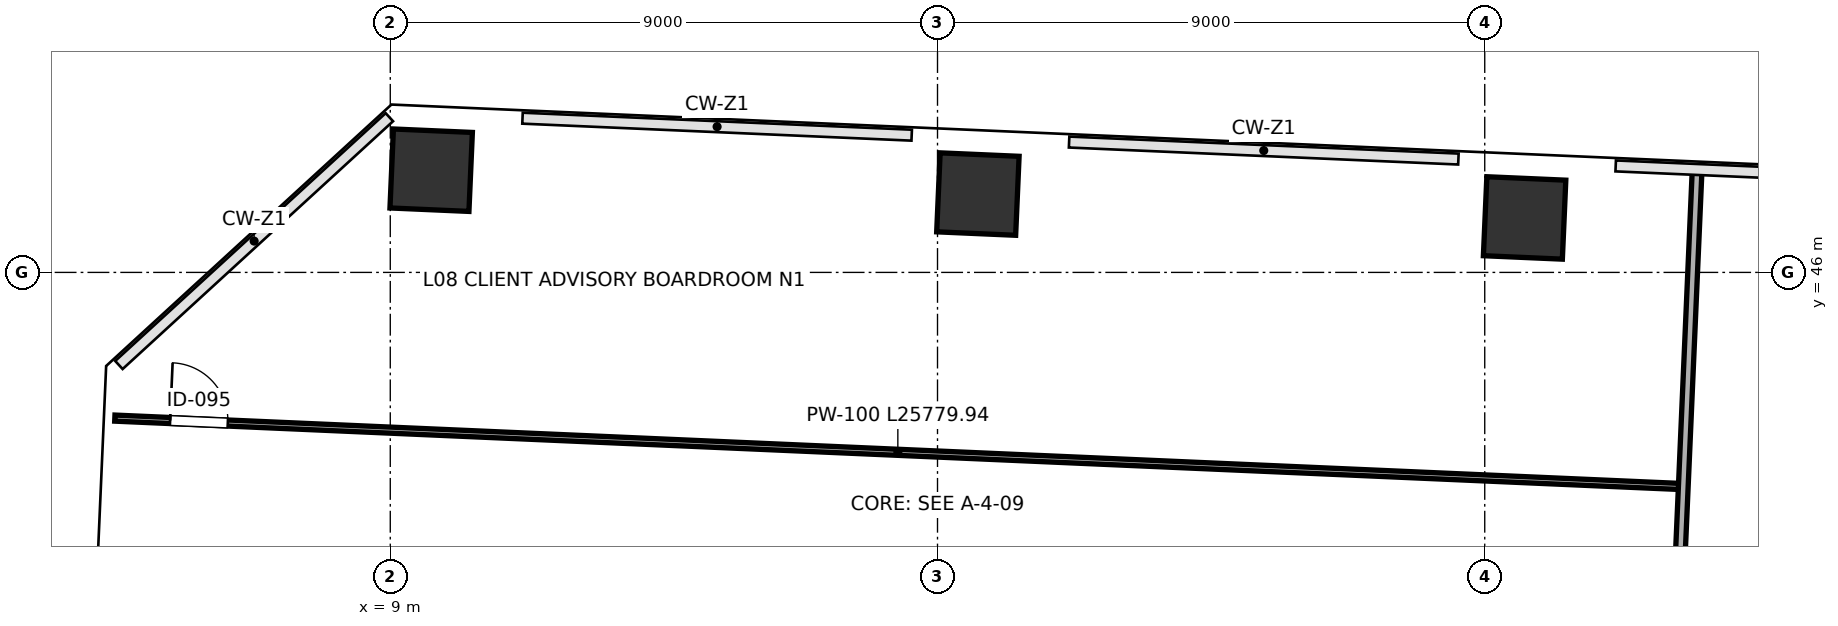
"""IFC4 building model, lengths in metres.
Left out: names, types, materials, properties, quantities, classifications, styles, units other than length and angle.
Written with IfcOpenShell. Run it as: python <this file> out.ifc"""

import sys

from ifc_helpers import new_model, si_unit, direction, frame, frame_2d, origin, origin_2d, place, context, subcontext, project, spatial, rectangle, extrude, clip, halfspace, source, transform, mapped, element, fill, save


model = new_model("IFC4")
c1 = context("Model", 3, precision=1e-05, world=origin(), true_north=direction((0.0, 1.0)))
c2 = subcontext(c1, "Body", "Model", "MODEL_VIEW")
j1 = project(units=[si_unit("LENGTHUNIT", "METRE"), si_unit("PLANEANGLEUNIT", "RADIAN")], contexts=[c1])
p1 = place(None, origin())
s1 = spatial("IfcSite", under=j1, at=p1, CompositionType="ELEMENT")
p2 = place(p1, origin())
s2 = spatial("IfcBuilding", under=s1, at=p2, CompositionType="ELEMENT")
p3 = place(p2, frame((0.0, 0.0, 37.6)))
s3 = spatial("IfcBuildingStorey", under=s2, at=p3, CompositionType="ELEMENT", Elevation=37.6)
p4 = place(p3, frame((9.673, 47.681, 0.0), z_axis=(0.071587138132, 0.052740418114, 0.996039020295), x_axis=(0.557597375125, -0.830102478241, 0.003878514181)))
e1 = element("IfcColumn", 1, at=p4, inside=s3, PredefinedType="COLUMN", context=c2, shape_type="Clipping", body=[
    clip(clip(extrude(rectangle(XDim=1.3, YDim=1.3, at=origin_2d()), origin(), (0.0, 0.0, 1.0), 4.819), halfspace(frame((0.0, 0.0, 0.061), z_axis=(0.0, 0.0, -1.0), x_axis=(1.0, 0.0, 0.0)), False)), halfspace(frame((0.0, 0.0, 4.758), z_axis=(0.0, 0.0, 1.0), x_axis=(1.0, 0.0, 0.0)), False)),
])
p5 = place(p3, frame((18.664, 47.288, 0.0), z_axis=(0.06940996214, 0.012126448064, 0.997514514387), x_axis=(0.129075287594, -0.991630033764, 0.003073478364)))
e2 = element("IfcColumn", 2, at=p5, inside=s3, PredefinedType="COLUMN", context=c2, shape_type="Clipping", body=[
    clip(clip(extrude(rectangle(XDim=1.3, YDim=1.3, at=origin_2d()), origin(), (0.0, 0.0, 1.0), 4.812), halfspace(frame((0.0, 0.0, 0.049), z_axis=(0.0, 0.0, -1.0), x_axis=(1.0, 0.0, 0.0)), False)), halfspace(frame((0.0, 0.0, 4.763), z_axis=(0.0, 0.0, 1.0), x_axis=(1.0, 0.0, 0.0)), False)),
])
p6 = place(p3, frame((27.656, 46.896, 0.0), z_axis=(0.067215559291, -0.028661729056, 0.997326713709), x_axis=(-0.431886115765, -0.901922515489, 0.003187328695)))
e3 = element("IfcColumn", 3, at=p6, inside=s3, PredefinedType="COLUMN", context=c2, shape_type="Clipping", body=[
    clip(clip(extrude(rectangle(XDim=1.3, YDim=1.3, at=origin_2d()), origin(), (0.0, 0.0, 1.0), 4.813), halfspace(frame((0.0, 0.0, 0.05), z_axis=(0.0, 0.0, -1.0), x_axis=(1.0, 0.0, 0.0)), False)), halfspace(frame((0.0, 0.0, 4.762), z_axis=(0.0, 0.0, 1.0), x_axis=(1.0, 0.0, 0.0)), False)),
])
p7 = place(p3, frame((5.015, 40.727, 0.0), z_axis=(0.040343484777, 0.074250257787, 0.996423254674), x_axis=(0.85708703444, -0.515158450518, 0.003685953743)))
e4 = element("IfcColumn", 4, at=p7, inside=s3, PredefinedType="PILASTER", context=c2, shape_type="Clipping", body=[
    clip(clip(extrude(rectangle(XDim=0.9, YDim=1.3, at=origin_2d()), origin(), (0.0, 0.0, 1.0), 4.817), halfspace(frame((0.0, 0.0, 0.057), z_axis=(0.0, 0.0, -1.0), x_axis=(1.0, 0.0, 0.0)), False)), halfspace(frame((0.0, 0.0, 4.76), z_axis=(0.0, 0.0, 1.0), x_axis=(1.0, 0.0, 0.0)), False)),
])
p8 = place(p3, frame((4.47, 43.604, 0.0), z_axis=(0.0, 0.0, 1.0), x_axis=(0.999047795436, -0.04362914662, 0.0)))
e5 = element("IfcWall", 5, at=p8, inside=s3, PredefinedType="PARTITIONING", context=c2, shape_type="SweptSolid", body=[
    extrude(rectangle(XDim=25.78, YDim=0.1, at=frame_2d((12.89, 0.0))), origin(), (0.0, 0.0, 1.0), 4.56),
])
p9 = place(p8, frame((0.91, 0.0, 0.0)))
e6 = element("IfcOpeningElement", 6, at=p9, cuts=e5, PredefinedType="OPENING", context=c2, shape_type="SweptSolid", body=[
    extrude(rectangle(XDim=0.95, YDim=2.15, at=frame_2d((0.475, 1.075))), frame((0.0, 0.06, 0.0), z_axis=(0.0, -1.0, 0.0), x_axis=(1.0, 0.0, 0.0)), (0.0, 0.0, 1.0), 0.12),
])
p10 = place(p3, frame((29.625, 27.822, 0.0), z_axis=(0.0, 0.0, 1.0), x_axis=(0.043623060059, 0.999048061222, 0.0)))
e7 = element("IfcWall", 7, at=p10, inside=s3, PredefinedType="PARTITIONING", context=c2, shape_type="SweptSolid", body=[
    extrude(rectangle(XDim=19.84, YDim=0.16, at=frame_2d((9.92, 0.0))), origin(), (0.0, 0.0, 1.0), 3.695),
])
m1 = source(origin(), c2, "Body", "SweptSolid", [
    extrude(rectangle(XDim=0.95, YDim=2.15, at=frame_2d((0.475, 1.075))), frame((0.0, 0.025, 0.0), z_axis=(0.0, -1.0, 0.0), x_axis=(1.0, 0.0, 0.0)), (0.0, 0.0, 1.0), 0.05),
])
p11 = place(p9, origin())
e8 = element("IfcDoor", 8, at=p11, inside=s3, OperationType="SINGLE_SWING_LEFT", PredefinedType="DOOR", context=c2, shape_type="MappedRepresentation", body=[
    mapped(m1, transform((0.0, 0.0, 0.0), scale=1.0)),
])
fill(e6, e8)
save(model, sys.argv[1])
